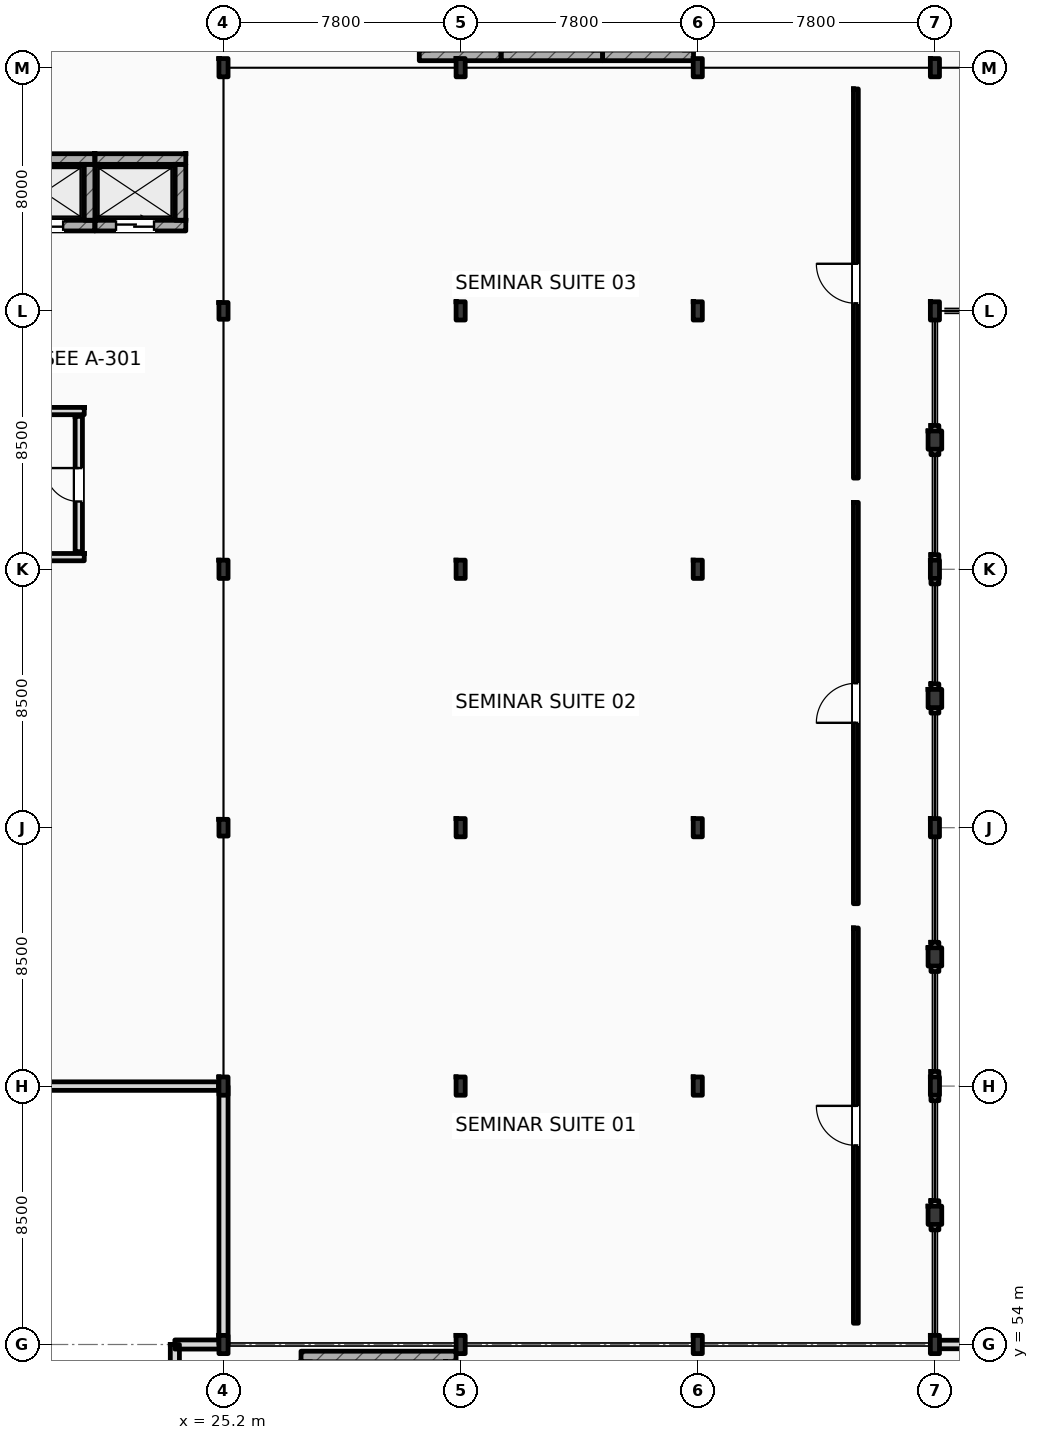
"""IFC4 building model, lengths in metres.
Left out: names, types, materials, properties, quantities, classifications, styles, units other than length and angle.
Written with IfcOpenShell. Run it as: python <this file> out.ifc"""

import sys

from ifc_helpers import new_model, si_unit, direction, frame, frame_2d, origin, origin_2d, place, context, subcontext, project, spatial, rectangle, i_section, extrude, element, fill, save


model = new_model("IFC4")
c1 = context("Model", 3, precision=1e-05, world=origin(), true_north=direction((0.0, 1.0)))
c2 = subcontext(c1, "Body", "Model", "MODEL_VIEW")
j1 = project(units=[si_unit("LENGTHUNIT", "METRE"), si_unit("PLANEANGLEUNIT", "RADIAN")], contexts=[c1])
p1 = place(None, origin())
s1 = spatial("IfcSite", under=j1, at=p1, CompositionType="ELEMENT")
p2 = place(p1, origin())
s2 = spatial("IfcBuilding", under=s1, at=p2, CompositionType="ELEMENT")
p3 = place(p2, frame((0.0, 0.0, 11.4)))
s3 = spatial("IfcBuildingStorey", under=s2, at=p3, CompositionType="ELEMENT", Elevation=11.4)
p4 = place(p3, frame((25.2, 62.5, 0.0), z_axis=(0.0, 0.0, 1.0), x_axis=(1.0, 0.0, 0.0)))
e1 = element("IfcColumn", 1, at=p4, inside=s3, PredefinedType="COLUMN", context=c2, shape_type="SweptSolid", body=[
    extrude(i_section(OverallWidth=0.3, OverallDepth=0.6, WebThickness=0.015, FlangeThickness=0.03, FilletRadius=0.027, at=origin_2d()), origin(), (0.0, 0.0, 1.0), 4.8),
])
p5 = place(p3, frame((25.2, 71.0, 0.0), z_axis=(0.0, 0.0, 1.0), x_axis=(1.0, 0.0, 0.0)))
e2 = element("IfcColumn", 2, at=p5, inside=s3, PredefinedType="COLUMN", context=c2, shape_type="SweptSolid", body=[
    extrude(i_section(OverallWidth=0.3, OverallDepth=0.55, WebThickness=0.015, FlangeThickness=0.029, FilletRadius=0.027, at=origin_2d()), origin(), (0.0, 0.0, 1.0), 4.8),
])
p6 = place(p3, frame((25.2, 79.5, 0.0), z_axis=(0.0, 0.0, 1.0), x_axis=(1.0, 0.0, 0.0)))
e3 = element("IfcColumn", 3, at=p6, inside=s3, PredefinedType="COLUMN", context=c2, shape_type="SweptSolid", body=[
    extrude(i_section(OverallWidth=0.3, OverallDepth=0.6, WebThickness=0.015, FlangeThickness=0.03, FilletRadius=0.027, at=origin_2d()), origin(), (0.0, 0.0, 1.0), 4.8),
])
p7 = place(p3, frame((25.2, 88.0, 0.0), z_axis=(0.0, 0.0, 1.0), x_axis=(1.0, 0.0, 0.0)))
e4 = element("IfcColumn", 4, at=p7, inside=s3, PredefinedType="COLUMN", context=c2, shape_type="SweptSolid", body=[
    extrude(i_section(OverallWidth=0.3, OverallDepth=0.55, WebThickness=0.015, FlangeThickness=0.029, FilletRadius=0.027, at=origin_2d()), origin(), (0.0, 0.0, 1.0), 4.8),
])
for number, where, z_axis, x_axis in (
    (5, (25.2, 96.0, 0.0), (0.0, 0.0, 1.0), (1.0, 0.0, 0.0)),
    (6, (33.0, 96.0, 0.0), (0.0, 0.0, 1.0), (1.0, 0.0, 0.0)),
    (7, (40.8, 96.0, 0.0), (0.0, 0.0, 1.0), (1.0, 0.0, 0.0)),
    (8, (48.6, 96.0, 0.0), (0.0, 0.0, 1.0), (1.0, 0.0, 0.0)),
    (9, (25.2, 54.0, 0.0), (0.0, 0.0, 1.0), (1.0, 0.0, 0.0)),
    (10, (33.0, 54.0, 0.0), (0.0, 0.0, 1.0), (1.0, 0.0, 0.0)),
    (11, (33.0, 62.5, 0.0), (0.0, 0.0, 1.0), (1.0, 0.0, 0.0)),
    (12, (33.0, 71.0, 0.0), (0.0, 0.0, 1.0), (1.0, 0.0, 0.0)),
    (13, (33.0, 79.5, 0.0), (0.0, 0.0, 1.0), (1.0, 0.0, 0.0)),
    (14, (33.0, 88.0, 0.0), (0.0, 0.0, 1.0), (1.0, 0.0, 0.0)),
    (15, (40.8, 54.0, 0.0), (0.0, 0.0, 1.0), (1.0, 0.0, 0.0)),
    (16, (40.8, 62.5, 0.0), (0.0, 0.0, 1.0), (1.0, 0.0, 0.0)),
    (17, (40.8, 71.0, 0.0), (0.0, 0.0, 1.0), (1.0, 0.0, 0.0)),
    (18, (40.8, 79.5, 0.0), (0.0, 0.0, 1.0), (1.0, 0.0, 0.0)),
    (19, (40.8, 88.0, 0.0), (0.0, 0.0, 1.0), (1.0, 0.0, 0.0)),
    (20, (48.6, 54.0, 0.0), (0.0, 0.0, 1.0), (1.0, 0.0, 0.0)),
    (21, (48.6, 62.5, 0.0), (0.0, 0.0, 1.0), (1.0, 0.0, 0.0)),
    (22, (48.6, 71.0, 0.0), (0.0, 0.0, 1.0), (1.0, 0.0, 0.0)),
    (23, (48.6, 79.5, 0.0), (0.0, 0.0, 1.0), (1.0, 0.0, 0.0)),
    (24, (48.6, 88.0, 0.0), (0.0, 0.0, 1.0), (1.0, 0.0, 0.0)),
):
    element("IfcColumn", number, at=place(p3, frame(where, z_axis=z_axis, x_axis=x_axis)), inside=s3, PredefinedType="COLUMN", context=c2, shape_type="SweptSolid", body=[
        extrude(i_section(OverallWidth=0.3, OverallDepth=0.6, WebThickness=0.015, FlangeThickness=0.03, FilletRadius=0.027, at=origin_2d()), origin(), (0.0, 0.0, 1.0), 4.8),
    ])
for number, where, z_axis, x_axis in (
    (25, (48.6, 58.25, 0.0), (0.0, 0.0, 1.0), (1.0, 0.0, 0.0)),
    (26, (48.6, 66.75, 0.0), (0.0, 0.0, 1.0), (1.0, 0.0, 0.0)),
    (27, (48.6, 75.25, 0.0), (0.0, 0.0, 1.0), (1.0, 0.0, 0.0)),
    (28, (48.6, 83.75, 0.0), (0.0, 0.0, 1.0), (1.0, 0.0, 0.0)),
):
    element("IfcColumn", number, at=place(p3, frame(where, z_axis=z_axis, x_axis=x_axis)), inside=s3, PredefinedType="PILASTER", context=c2, shape_type="SweptSolid", body=[
        extrude(rectangle(XDim=0.45, YDim=0.6, at=origin_2d()), origin(), (0.0, 0.0, 1.0), 4.8),
    ])
p8 = place(p3, frame((27.75, 53.605, 0.0), z_axis=(0.0, 0.0, 1.0), x_axis=(1.0, 0.0, 0.0)))
e29 = element("IfcWall", 29, at=p8, inside=s3, PredefinedType="SHEAR", context=c2, shape_type="SweptSolid", body=[
    extrude(rectangle(XDim=5.1, YDim=0.35, at=frame_2d((2.55, 0.0))), origin(), (0.0, 0.0, 1.0), 4.8),
])
p9 = place(p3, frame((23.6, 45.0, 0.0), z_axis=(0.0, 0.0, 1.0), x_axis=(0.0, 1.0, 0.0)))
e30 = element("IfcWall", 30, at=p9, inside=s3, PredefinedType="STANDARD", context=c2, shape_type="SweptSolid", body=[
    extrude(rectangle(XDim=9.0, YDim=0.3, at=frame_2d((4.5, 0.0))), origin(), (0.0, 0.0, 1.0), 4.06),
])
p10 = place(p9, frame((3.45, 0.0, 1.05)))
e31 = element("IfcOpeningElement", 31, at=p10, cuts=e30, PredefinedType="OPENING", context=c2, shape_type="SweptSolid", body=[
    extrude(rectangle(XDim=2.1, YDim=2.2, at=frame_2d((1.05, 1.1))), frame((0.0, 0.16, 0.0), z_axis=(0.0, -1.0, 0.0), x_axis=(1.0, 0.0, 0.0)), (0.0, 0.0, 1.0), 0.32),
])
p11 = place(p3, frame((48.6, 54.0, 0.0), z_axis=(0.0, 0.0, 1.0), x_axis=(1.0, 0.0, 0.0)))
e32 = element("IfcWall", 32, at=p11, inside=s3, PredefinedType="STANDARD", context=c2, shape_type="SweptSolid", body=[
    extrude(rectangle(XDim=15.6, YDim=0.28, at=frame_2d((7.8, 0.0))), origin(), (0.0, 0.0, 1.0), 4.06),
])
p12 = place(p11, frame((8.75, 0.0, 1.05)))
e33 = element("IfcOpeningElement", 33, at=p12, cuts=e32, PredefinedType="OPENING", context=c2, shape_type="SweptSolid", body=[
    extrude(rectangle(XDim=2.1, YDim=2.2, at=frame_2d((1.05, 1.1))), frame((0.0, 0.15, 0.0), z_axis=(0.0, -1.0, 0.0), x_axis=(1.0, 0.0, 0.0)), (0.0, 0.0, 1.0), 0.3),
])
for number, where, z_axis, x_axis in (
    (34, (48.6, 57.77, 0.0), (0.0, 0.0, 1.0), (0.0, 1.0, 0.0)),
    (35, (48.6, 62.02, 0.0), (0.0, 0.0, 1.0), (0.0, 1.0, 0.0)),
    (36, (48.6, 66.27, 0.0), (0.0, 0.0, 1.0), (0.0, 1.0, 0.0)),
    (37, (48.6, 74.77, 0.0), (0.0, 0.0, 1.0), (0.0, 1.0, 0.0)),
    (38, (48.6, 79.02, 0.0), (0.0, 0.0, 1.0), (0.0, 1.0, 0.0)),
    (39, (48.6, 83.27, 0.0), (0.0, 0.0, 1.0), (0.0, 1.0, 0.0)),
):
    element("IfcWall", number, at=place(p3, frame(where, z_axis=z_axis, x_axis=x_axis)), inside=s3, PredefinedType="STANDARD", context=c2, shape_type="SweptSolid", body=[
        extrude(rectangle(XDim=0.96, YDim=0.26, at=frame_2d((0.48, 0.0))), origin(), (0.0, 0.0, 1.0), 4.11),
    ])
p13 = place(p3, frame((25.2, 54.0, 0.0), z_axis=(0.0, 0.0, 1.0), x_axis=(0.0, 1.0, 0.0)))
e40 = element("IfcWall", 40, at=p13, inside=s3, PredefinedType="STANDARD", context=c2, shape_type="SweptSolid", body=[
    extrude(rectangle(XDim=8.5, YDim=0.3, at=frame_2d((4.25, 0.0))), origin(), (0.0, 0.0, 1.0), 4.11),
])
p14 = place(p3, frame((23.6, 54.0, 0.0), z_axis=(0.0, 0.0, 1.0), x_axis=(1.0, 0.0, 0.0)))
e41 = element("IfcWall", 41, at=p14, inside=s3, PredefinedType="STANDARD", context=c2, shape_type="SweptSolid", body=[
    extrude(rectangle(XDim=1.6, YDim=0.3, at=frame_2d((0.8, 0.0))), origin(), (0.0, 0.0, 1.0), 4.54),
])
p15 = place(p3, frame((0.0, 62.5, 0.0), z_axis=(0.0, 0.0, 1.0), x_axis=(1.0, 0.0, 0.0)))
e42 = element("IfcWall", 42, at=p15, inside=s3, PredefinedType="STANDARD", context=c2, shape_type="SweptSolid", body=[
    extrude(rectangle(XDim=25.2, YDim=0.28, at=frame_2d((12.6, 0.0))), origin(), (0.0, 0.0, 1.0), 3.96),
])
p16 = place(p3, frame((31.64, 96.405, 0.0), z_axis=(0.0, 0.0, 1.0), x_axis=(1.0, 0.0, 0.0)))
e43 = element("IfcWall", 43, at=p16, inside=s3, PredefinedType="SHEAR", context=c2, shape_type="SweptSolid", body=[
    extrude(rectangle(XDim=2.69, YDim=0.35, at=frame_2d((1.345, 0.0))), origin(), (0.0, 0.0, 1.0), 4.52),
])
p17 = place(p3, frame((17.63, 92.995, 0.0), z_axis=(0.0, 0.0, 1.0), x_axis=(1.0, 0.0, 0.0)))
e44 = element("IfcWall", 44, at=p17, inside=s3, PredefinedType="SHEAR", context=c2, shape_type="SweptSolid", body=[
    extrude(rectangle(XDim=3.34, YDim=0.35, at=frame_2d((1.67, 0.0))), origin(), (0.0, 0.0, 1.0), 4.52),
])
p18 = place(p3, frame((17.63, 90.805, 0.0), z_axis=(0.0, 0.0, 1.0), x_axis=(1.0, 0.0, 0.0)))
e45 = element("IfcWall", 45, at=p18, inside=s3, PredefinedType="SHEAR", context=c2, shape_type="SweptSolid", body=[
    extrude(rectangle(XDim=3.34, YDim=0.35, at=frame_2d((1.67, 0.0))), origin(), (0.0, 0.0, 1.0), 4.52),
])
p19 = place(p18, frame((1.045, 0.0, 0.0)))
e46 = element("IfcOpeningElement", 46, at=p19, cuts=e45, PredefinedType="OPENING", context=c2, shape_type="SweptSolid", body=[
    extrude(rectangle(XDim=1.25, YDim=2.25, at=frame_2d((0.625, 1.125))), frame((0.0, 0.185, 0.0), z_axis=(0.0, -1.0, 0.0), x_axis=(1.0, 0.0, 0.0)), (0.0, 0.0, 1.0), 0.37),
])
p20 = place(p3, frame((20.795, 90.98, 0.0), z_axis=(0.0, 0.0, 1.0), x_axis=(0.0, 1.0, 0.0)))
e47 = element("IfcWall", 47, at=p20, inside=s3, PredefinedType="SHEAR", context=c2, shape_type="SweptSolid", body=[
    extrude(rectangle(XDim=1.84, YDim=0.35, at=frame_2d((0.92, 0.0))), origin(), (0.0, 0.0, 1.0), 4.52),
])
p21 = place(p3, frame((20.97, 92.995, 0.0), z_axis=(0.0, 0.0, 1.0), x_axis=(1.0, 0.0, 0.0)))
e48 = element("IfcWall", 48, at=p21, inside=s3, PredefinedType="SHEAR", context=c2, shape_type="SweptSolid", body=[
    extrude(rectangle(XDim=2.99, YDim=0.35, at=frame_2d((1.495, 0.0))), origin(), (0.0, 0.0, 1.0), 4.52),
])
p22 = place(p3, frame((20.97, 90.805, 0.0), z_axis=(0.0, 0.0, 1.0), x_axis=(1.0, 0.0, 0.0)))
e49 = element("IfcWall", 49, at=p22, inside=s3, PredefinedType="SHEAR", context=c2, shape_type="SweptSolid", body=[
    extrude(rectangle(XDim=2.99, YDim=0.35, at=frame_2d((1.495, 0.0))), origin(), (0.0, 0.0, 1.0), 4.52),
])
p23 = place(p22, frame((0.695, 0.0, 0.0)))
e50 = element("IfcOpeningElement", 50, at=p23, cuts=e49, PredefinedType="OPENING", context=c2, shape_type="SweptSolid", body=[
    extrude(rectangle(XDim=1.25, YDim=2.25, at=frame_2d((0.625, 1.125))), frame((0.0, 0.185, 0.0), z_axis=(0.0, -1.0, 0.0), x_axis=(1.0, 0.0, 0.0)), (0.0, 0.0, 1.0), 0.37),
])
p24 = place(p3, frame((23.785, 90.98, 0.0), z_axis=(0.0, 0.0, 1.0), x_axis=(0.0, 1.0, 0.0)))
e51 = element("IfcWall", 51, at=p24, inside=s3, PredefinedType="SHEAR", context=c2, shape_type="SweptSolid", body=[
    extrude(rectangle(XDim=1.84, YDim=0.35, at=frame_2d((0.92, 0.0))), origin(), (0.0, 0.0, 1.0), 4.52),
])
p25 = place(p3, frame((34.33, 96.405, 0.0), z_axis=(0.0, 0.0, 1.0), x_axis=(1.0, 0.0, 0.0)))
e52 = element("IfcWall", 52, at=p25, inside=s3, PredefinedType="SHEAR", context=c2, shape_type="SweptSolid", body=[
    extrude(rectangle(XDim=3.34, YDim=0.35, at=frame_2d((1.67, 0.0))), origin(), (0.0, 0.0, 1.0), 4.52),
])
p26 = place(p3, frame((37.67, 96.405, 0.0), z_axis=(0.0, 0.0, 1.0), x_axis=(1.0, 0.0, 0.0)))
e53 = element("IfcWall", 53, at=p26, inside=s3, PredefinedType="SHEAR", context=c2, shape_type="SweptSolid", body=[
    extrude(rectangle(XDim=2.99, YDim=0.35, at=frame_2d((1.495, 0.0))), origin(), (0.0, 0.0, 1.0), 4.52),
])
p27 = place(p3, frame((15.76, 79.9, 0.0), z_axis=(0.0, 0.0, 1.0), x_axis=(1.0, 0.0, 0.0)))
e54 = element("IfcWall", 54, at=p27, inside=s3, PredefinedType="STANDARD", context=c2, shape_type="SweptSolid", body=[
    extrude(rectangle(XDim=4.86, YDim=0.24, at=frame_2d((2.43, 0.0))), origin(), (0.0, 0.0, 1.0), 4.52),
])
p28 = place(p3, frame((18.45, 84.705, 0.0), z_axis=(0.0, 0.0, 1.0), x_axis=(1.0, 0.0, 0.0)))
e55 = element("IfcWall", 55, at=p28, inside=s3, PredefinedType="STANDARD", context=c2, shape_type="SweptSolid", body=[
    extrude(rectangle(XDim=2.17, YDim=0.24, at=frame_2d((1.085, 0.0))), origin(), (0.0, 0.0, 1.0), 4.52),
])
p29 = place(p3, frame((20.44, 80.08, 0.0), z_axis=(0.0, 0.0, 1.0), x_axis=(0.0, 1.0, 0.0)))
e56 = element("IfcWall", 56, at=p29, inside=s3, PredefinedType="STANDARD", context=c2, shape_type="SweptSolid", body=[
    extrude(rectangle(XDim=4.45, YDim=0.24, at=frame_2d((2.225, 0.0))), origin(), (0.0, 0.0, 1.0), 4.52),
])
p30 = place(p29, frame((1.65, 0.0, 0.0)))
e57 = element("IfcOpeningElement", 57, at=p30, cuts=e56, PredefinedType="OPENING", context=c2, shape_type="SweptSolid", body=[
    extrude(rectangle(XDim=1.1, YDim=2.2, at=frame_2d((0.55, 1.1))), frame((0.0, 0.13, 0.0), z_axis=(0.0, -1.0, 0.0), x_axis=(1.0, 0.0, 0.0)), (0.0, 0.0, 1.0), 0.26),
])
p31 = place(p3, frame((46.0, 54.7, 0.0), z_axis=(0.0, 0.0, 1.0), x_axis=(0.0, 1.0, 0.0)))
e58 = element("IfcWall", 58, at=p31, inside=s3, PredefinedType="PARTITIONING", context=c2, shape_type="SweptSolid", body=[
    extrude(rectangle(XDim=13.0, YDim=0.16, at=frame_2d((6.5, 0.0))), origin(), (0.0, 0.0, 1.0), 4.18),
])
p32 = place(p31, frame((5.85, 0.0, 0.0)))
e59 = element("IfcOpeningElement", 59, at=p32, cuts=e58, PredefinedType="OPENING", context=c2, shape_type="SweptSolid", body=[
    extrude(rectangle(XDim=1.3, YDim=2.2, at=frame_2d((0.65, 1.1))), frame((0.0, 0.09, 0.0), z_axis=(0.0, -1.0, 0.0), x_axis=(1.0, 0.0, 0.0)), (0.0, 0.0, 1.0), 0.18),
])
p33 = place(p3, frame((46.0, 68.5, 0.0), z_axis=(0.0, 0.0, 1.0), x_axis=(0.0, 1.0, 0.0)))
e60 = element("IfcWall", 60, at=p33, inside=s3, PredefinedType="PARTITIONING", context=c2, shape_type="SweptSolid", body=[
    extrude(rectangle(XDim=13.2, YDim=0.16, at=frame_2d((6.6, 0.0))), origin(), (0.0, 0.0, 1.0), 4.18),
])
p34 = place(p33, frame((5.95, 0.0, 0.0)))
e61 = element("IfcOpeningElement", 61, at=p34, cuts=e60, PredefinedType="OPENING", context=c2, shape_type="SweptSolid", body=[
    extrude(rectangle(XDim=1.3, YDim=2.2, at=frame_2d((0.65, 1.1))), frame((0.0, 0.09, 0.0), z_axis=(0.0, -1.0, 0.0), x_axis=(1.0, 0.0, 0.0)), (0.0, 0.0, 1.0), 0.18),
])
p35 = place(p3, frame((46.0, 82.5, 0.0), z_axis=(0.0, 0.0, 1.0), x_axis=(0.0, 1.0, 0.0)))
e62 = element("IfcWall", 62, at=p35, inside=s3, PredefinedType="PARTITIONING", context=c2, shape_type="SweptSolid", body=[
    extrude(rectangle(XDim=12.8, YDim=0.16, at=frame_2d((6.4, 0.0))), origin(), (0.0, 0.0, 1.0), 4.18),
])
p36 = place(p35, frame((5.75, 0.0, 0.0)))
e63 = element("IfcOpeningElement", 63, at=p36, cuts=e62, PredefinedType="OPENING", context=c2, shape_type="SweptSolid", body=[
    extrude(rectangle(XDim=1.3, YDim=2.2, at=frame_2d((0.65, 1.1))), frame((0.0, 0.09, 0.0), z_axis=(0.0, -1.0, 0.0), x_axis=(1.0, 0.0, 0.0)), (0.0, 0.0, 1.0), 0.18),
])
p37 = place(p19, origin())
e64 = element("IfcDoor", 64, at=p37, inside=s3, OperationType="SLIDING_TO_LEFT", PredefinedType="DOOR", context=c2, shape_type="SweptSolid", body=[
    extrude(rectangle(XDim=1.25, YDim=2.25, at=frame_2d((0.625, 1.125))), frame((0.0, 0.025, 0.0), z_axis=(0.0, -1.0, 0.0), x_axis=(1.0, 0.0, 0.0)), (0.0, 0.0, 1.0), 0.05),
])
fill(e46, e64)
p38 = place(p23, origin())
e65 = element("IfcDoor", 65, at=p38, inside=s3, OperationType="SLIDING_TO_LEFT", PredefinedType="DOOR", context=c2, shape_type="SweptSolid", body=[
    extrude(rectangle(XDim=1.25, YDim=2.25, at=frame_2d((0.625, 1.125))), frame((0.0, 0.025, 0.0), z_axis=(0.0, -1.0, 0.0), x_axis=(1.0, 0.0, 0.0)), (0.0, 0.0, 1.0), 0.05),
])
fill(e50, e65)
p39 = place(p30, origin())
e66 = element("IfcDoor", 66, at=p39, inside=s3, OperationType="SINGLE_SWING_RIGHT", PredefinedType="DOOR", context=c2, shape_type="SweptSolid", body=[
    extrude(rectangle(XDim=1.1, YDim=2.2, at=frame_2d((0.55, 1.1))), frame((0.0, 0.025, 0.0), z_axis=(0.0, -1.0, 0.0), x_axis=(1.0, 0.0, 0.0)), (0.0, 0.0, 1.0), 0.05),
])
fill(e57, e66)
p40 = place(p32, origin())
e67 = element("IfcDoor", 67, at=p40, inside=s3, OperationType="SINGLE_SWING_RIGHT", PredefinedType="DOOR", context=c2, shape_type="SweptSolid", body=[
    extrude(rectangle(XDim=1.3, YDim=2.2, at=frame_2d((0.65, 1.1))), frame((0.0, 0.025, 0.0), z_axis=(0.0, -1.0, 0.0), x_axis=(1.0, 0.0, 0.0)), (0.0, 0.0, 1.0), 0.05),
])
fill(e59, e67)
p41 = place(p34, origin())
e68 = element("IfcDoor", 68, at=p41, inside=s3, OperationType="SINGLE_SWING_LEFT", PredefinedType="DOOR", context=c2, shape_type="SweptSolid", body=[
    extrude(rectangle(XDim=1.3, YDim=2.2, at=frame_2d((0.65, 1.1))), frame((0.0, 0.025, 0.0), z_axis=(0.0, -1.0, 0.0), x_axis=(1.0, 0.0, 0.0)), (0.0, 0.0, 1.0), 0.05),
])
fill(e61, e68)
p42 = place(p36, origin())
e69 = element("IfcDoor", 69, at=p42, inside=s3, OperationType="SINGLE_SWING_RIGHT", PredefinedType="DOOR", context=c2, shape_type="SweptSolid", body=[
    extrude(rectangle(XDim=1.3, YDim=2.2, at=frame_2d((0.65, 1.1))), frame((0.0, 0.025, 0.0), z_axis=(0.0, -1.0, 0.0), x_axis=(1.0, 0.0, 0.0)), (0.0, 0.0, 1.0), 0.05),
])
fill(e63, e69)
save(model, sys.argv[1])
